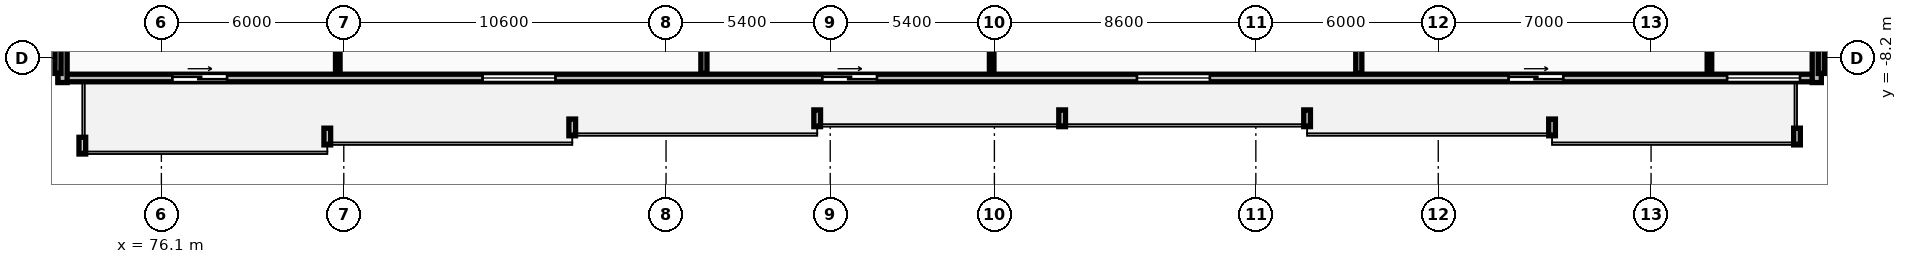
"""IFC4 building model, lengths in metres.
Left out: names, types, materials, properties, quantities, classifications, styles, units other than length and angle.
Written with IfcOpenShell. Run it as: python <this file> out.ifc"""

import sys

from ifc_helpers import new_model, si_unit, direction, frame, frame_2d, origin, place, context, subcontext, project, spatial, rectangle, extrude, element, fill, save


model = new_model("IFC4")
c1 = context("Model", 3, precision=1e-05, world=origin(), true_north=direction((0.0, 1.0)))
c2 = subcontext(c1, "Body", "Model", "MODEL_VIEW")
j1 = project(units=[si_unit("LENGTHUNIT", "METRE"), si_unit("PLANEANGLEUNIT", "RADIAN")], contexts=[c1])
p1 = place(None, origin())
s1 = spatial("IfcSite", under=j1, at=p1, CompositionType="ELEMENT")
p2 = place(p1, origin())
s2 = spatial("IfcBuilding", under=s1, at=p2, CompositionType="ELEMENT")
p3 = place(p2, frame((0.0, 0.0, 150.1)))
s3 = spatial("IfcBuildingStorey", under=s2, at=p3, CompositionType="ELEMENT", Elevation=150.1)
p4 = place(p3, frame((72.7, -8.85, 0.0), z_axis=(0.0, 0.0, 1.0), x_axis=(1.0, 0.0, 0.0)))
e1 = element("IfcWall", 1, at=p4, inside=s3, PredefinedType="STANDARD", context=c2, shape_type="SweptSolid", body=[
    extrude(rectangle(XDim=58.0, YDim=0.25, at=frame_2d((29.0, 0.0))), origin(), (0.0, 0.0, 1.0), 3.31),
])
p5 = place(p4, frame((3.761, 0.0, 0.0)))
e2 = element("IfcOpeningElement", 2, at=p5, cuts=e1, PredefinedType="OPENING", context=c2, shape_type="SweptSolid", body=[
    extrude(rectangle(XDim=1.8, YDim=2.2, at=frame_2d((0.9, 1.1))), frame((0.0, 0.135, 0.0), z_axis=(0.0, -1.0, 0.0), x_axis=(1.0, 0.0, 0.0)), (0.0, 0.0, 1.0), 0.27),
])
p6 = place(p4, frame((13.964, 0.0, 0.85)))
e3 = element("IfcOpeningElement", 3, at=p6, cuts=e1, PredefinedType="OPENING", context=c2, shape_type="SweptSolid", body=[
    extrude(rectangle(XDim=2.4, YDim=1.9, at=frame_2d((1.2, 0.95))), frame((0.0, 0.135, 0.0), z_axis=(0.0, -1.0, 0.0), x_axis=(1.0, 0.0, 0.0)), (0.0, 0.0, 1.0), 0.27),
])
p7 = place(p4, frame((25.138, 0.0, 0.0)))
e4 = element("IfcOpeningElement", 4, at=p7, cuts=e1, PredefinedType="OPENING", context=c2, shape_type="SweptSolid", body=[
    extrude(rectangle(XDim=1.8, YDim=2.2, at=frame_2d((0.9, 1.1))), frame((0.0, 0.135, 0.0), z_axis=(0.0, -1.0, 0.0), x_axis=(1.0, 0.0, 0.0)), (0.0, 0.0, 1.0), 0.27),
])
p8 = place(p4, frame((35.489, 0.0, 0.85)))
e5 = element("IfcOpeningElement", 5, at=p8, cuts=e1, PredefinedType="OPENING", context=c2, shape_type="SweptSolid", body=[
    extrude(rectangle(XDim=2.4, YDim=1.9, at=frame_2d((1.2, 0.95))), frame((0.0, 0.135, 0.0), z_axis=(0.0, -1.0, 0.0), x_axis=(1.0, 0.0, 0.0)), (0.0, 0.0, 1.0), 0.27),
])
p9 = place(p4, frame((47.713, 0.0, 0.0)))
e6 = element("IfcOpeningElement", 6, at=p9, cuts=e1, PredefinedType="OPENING", context=c2, shape_type="SweptSolid", body=[
    extrude(rectangle(XDim=1.8, YDim=2.2, at=frame_2d((0.9, 1.1))), frame((0.0, 0.135, 0.0), z_axis=(0.0, -1.0, 0.0), x_axis=(1.0, 0.0, 0.0)), (0.0, 0.0, 1.0), 0.27),
])
p10 = place(p4, frame((54.9, 0.0, 0.85)))
e7 = element("IfcOpeningElement", 7, at=p10, cuts=e1, PredefinedType="OPENING", context=c2, shape_type="SweptSolid", body=[
    extrude(rectangle(XDim=2.4, YDim=1.9, at=frame_2d((1.2, 0.95))), frame((0.0, 0.135, 0.0), z_axis=(0.0, -1.0, 0.0), x_axis=(1.0, 0.0, 0.0)), (0.0, 0.0, 1.0), 0.27),
])
for number, where, z_axis, x_axis in (
    (8, (130.55, -9.0, 0.0), (0.0, 0.0, 1.0), (0.0, 1.0, 0.0)),
    (9, (72.85, -5.4, 0.0), (0.0, 0.0, 1.0), (0.0, -1.0, 0.0)),
):
    element("IfcWall", number, at=place(p3, frame(where, z_axis=z_axis, x_axis=x_axis)), inside=s3, PredefinedType="STANDARD", context=c2, shape_type="SweptSolid", body=[
        extrude(rectangle(XDim=3.6, YDim=0.3, at=frame_2d((1.8, 0.0))), origin(), (0.0, 0.0, 1.0), 3.31),
    ])
for number, where, z_axis, x_axis in (
    (10, (72.7, -8.7, 0.0), (0.0, 0.0, 1.0), (0.0, 1.0, 0.0)),
    (11, (130.7, -8.7, 0.0), (0.0, 0.0, 1.0), (0.0, 1.0, 0.0)),
    (12, (93.946, -8.7, 0.0), (0.0, 0.0, 1.0), (0.0, 1.0, 0.0)),
):
    element("IfcWall", number, at=place(p3, frame(where, z_axis=z_axis, x_axis=x_axis)), inside=s3, PredefinedType="PARTITIONING", context=c2, shape_type="SweptSolid", body=[
        extrude(rectangle(XDim=24.57, YDim=0.2, at=frame_2d((12.285, 0.0))), origin(), (0.0, 0.0, 1.0), 3.31),
    ])
p11 = place(p3, frame((81.903, -8.7, 0.0), z_axis=(0.0, 0.0, 1.0), x_axis=(0.0, 1.0, 0.0)))
e13 = element("IfcWall", 13, at=p11, inside=s3, PredefinedType="PARTITIONING", context=c2, shape_type="SweptSolid", body=[
    extrude(rectangle(XDim=4.47, YDim=0.15, at=frame_2d((2.235, 0.0))), origin(), (0.0, 0.0, 1.0), 3.31),
])
p12 = place(p3, frame((115.486, -8.7, 0.0), z_axis=(0.0, 0.0, 1.0), x_axis=(0.0, 1.0, 0.0)))
e14 = element("IfcWall", 14, at=p12, inside=s3, PredefinedType="PARTITIONING", context=c2, shape_type="SweptSolid", body=[
    extrude(rectangle(XDim=24.57, YDim=0.2, at=frame_2d((12.285, 0.0))), origin(), (0.0, 0.0, 1.0), 3.31),
])
p13 = place(p3, frame((103.411, -8.7, 0.0), z_axis=(0.0, 0.0, 1.0), x_axis=(0.0, 1.0, 0.0)))
e15 = element("IfcWall", 15, at=p13, inside=s3, PredefinedType="PARTITIONING", context=c2, shape_type="SweptSolid", body=[
    extrude(rectangle(XDim=4.47, YDim=0.15, at=frame_2d((2.235, 0.0))), origin(), (0.0, 0.0, 1.0), 3.31),
])
p14 = place(p3, frame((127.02, -8.7, 0.0), z_axis=(0.0, 0.0, 1.0), x_axis=(0.0, 1.0, 0.0)))
e16 = element("IfcWall", 16, at=p14, inside=s3, PredefinedType="PARTITIONING", context=c2, shape_type="SweptSolid", body=[
    extrude(rectangle(XDim=9.61, YDim=0.15, at=frame_2d((4.805, 0.0))), origin(), (0.0, 0.0, 1.0), 3.31),
])
p15 = place(p14, frame((5.892, 0.0, 0.0)))
e17 = element("IfcOpeningElement", 17, at=p15, cuts=e16, PredefinedType="OPENING", context=c2, shape_type="SweptSolid", body=[
    extrude(rectangle(XDim=0.84, YDim=2.04, at=frame_2d((0.42, 1.02))), frame((0.0, 0.085, 0.0), z_axis=(0.0, -1.0, 0.0), x_axis=(1.0, 0.0, 0.0)), (0.0, 0.0, 1.0), 0.17),
])
p16 = place(p14, frame((7.34, 0.0, 0.0)))
e18 = element("IfcOpeningElement", 18, at=p16, cuts=e16, PredefinedType="OPENING", context=c2, shape_type="SweptSolid", body=[
    extrude(rectangle(XDim=0.84, YDim=2.04, at=frame_2d((0.42, 1.02))), frame((0.0, 0.085, 0.0), z_axis=(0.0, -1.0, 0.0), x_axis=(1.0, 0.0, 0.0)), (0.0, 0.0, 1.0), 0.17),
])
p17 = place(p14, frame((2.194, 0.0, 0.0)))
e19 = element("IfcOpeningElement", 19, at=p17, cuts=e16, PredefinedType="OPENING", context=c2, shape_type="SweptSolid", body=[
    extrude(rectangle(XDim=0.88, YDim=2.06, at=frame_2d((0.44, 1.03))), frame((0.0, 0.085, 0.0), z_axis=(0.0, -1.0, 0.0), x_axis=(1.0, 0.0, 0.0)), (0.0, 0.0, 1.0), 0.17),
])
p18 = place(p5, origin())
e20 = element("IfcDoor", 20, at=p18, inside=s3, OperationType="SLIDING_TO_RIGHT", PredefinedType="DOOR", context=c2, shape_type="SweptSolid", body=[
    extrude(rectangle(XDim=1.8, YDim=2.2, at=frame_2d((0.9, 1.1))), frame((0.0, 0.025, 0.0), z_axis=(0.0, -1.0, 0.0), x_axis=(1.0, 0.0, 0.0)), (0.0, 0.0, 1.0), 0.05),
])
fill(e2, e20)
p19 = place(p6, origin())
e21 = element("IfcWindow", 21, at=p19, inside=s3, PartitioningType="DOUBLE_PANEL_VERTICAL", PredefinedType="WINDOW", context=c2, shape_type="SweptSolid", body=[
    extrude(rectangle(XDim=2.4, YDim=1.9, at=frame_2d((1.2, 0.95))), frame((0.0, 0.03, 0.0), z_axis=(0.0, -1.0, 0.0), x_axis=(1.0, 0.0, 0.0)), (0.0, 0.0, 1.0), 0.06),
])
fill(e3, e21)
p20 = place(p7, origin())
e22 = element("IfcDoor", 22, at=p20, inside=s3, OperationType="SLIDING_TO_RIGHT", PredefinedType="DOOR", context=c2, shape_type="SweptSolid", body=[
    extrude(rectangle(XDim=1.8, YDim=2.2, at=frame_2d((0.9, 1.1))), frame((0.0, 0.025, 0.0), z_axis=(0.0, -1.0, 0.0), x_axis=(1.0, 0.0, 0.0)), (0.0, 0.0, 1.0), 0.05),
])
fill(e4, e22)
p21 = place(p8, origin())
e23 = element("IfcWindow", 23, at=p21, inside=s3, PartitioningType="DOUBLE_PANEL_VERTICAL", PredefinedType="WINDOW", context=c2, shape_type="SweptSolid", body=[
    extrude(rectangle(XDim=2.4, YDim=1.9, at=frame_2d((1.2, 0.95))), frame((0.0, 0.03, 0.0), z_axis=(0.0, -1.0, 0.0), x_axis=(1.0, 0.0, 0.0)), (0.0, 0.0, 1.0), 0.06),
])
fill(e5, e23)
p22 = place(p9, origin())
e24 = element("IfcDoor", 24, at=p22, inside=s3, OperationType="SLIDING_TO_RIGHT", PredefinedType="DOOR", context=c2, shape_type="SweptSolid", body=[
    extrude(rectangle(XDim=1.8, YDim=2.2, at=frame_2d((0.9, 1.1))), frame((0.0, 0.025, 0.0), z_axis=(0.0, -1.0, 0.0), x_axis=(1.0, 0.0, 0.0)), (0.0, 0.0, 1.0), 0.05),
])
fill(e6, e24)
p23 = place(p10, origin())
e25 = element("IfcWindow", 25, at=p23, inside=s3, PartitioningType="DOUBLE_PANEL_VERTICAL", PredefinedType="WINDOW", context=c2, shape_type="SweptSolid", body=[
    extrude(rectangle(XDim=2.4, YDim=1.9, at=frame_2d((1.2, 0.95))), frame((0.0, 0.03, 0.0), z_axis=(0.0, -1.0, 0.0), x_axis=(1.0, 0.0, 0.0)), (0.0, 0.0, 1.0), 0.06),
])
fill(e7, e25)
save(model, sys.argv[1])
